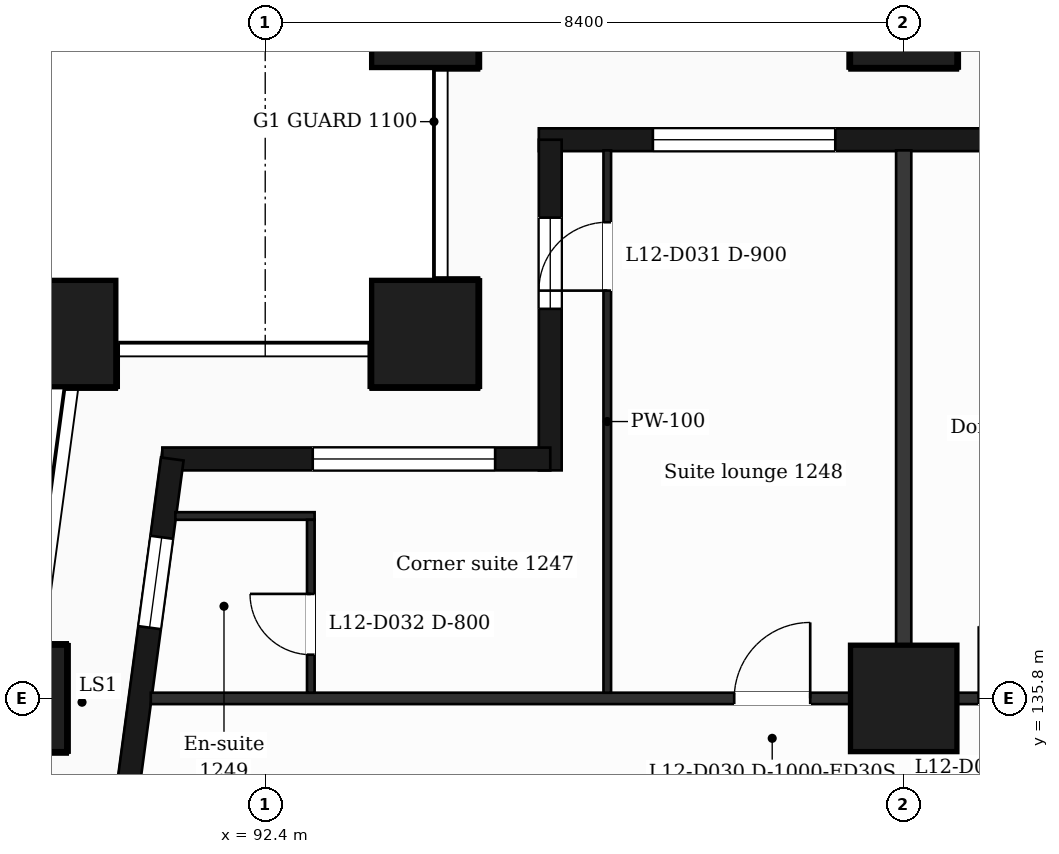
"""IFC4 building model, lengths in metres.
Left out: names, types, materials, properties, quantities, classifications, styles, units other than length and angle.
Written with IfcOpenShell. Run it as: python <this file> out.ifc"""

import sys

from ifc_helpers import new_model, si_unit, direction, frame, frame_2d, origin, origin_2d, place, context, subcontext, project, spatial, rectangle, extrude, element, fill, save


model = new_model("IFC4")
c1 = context("Model", 3, precision=1e-05, world=origin(), true_north=direction((0.0, 1.0)))
c2 = subcontext(c1, "Body", "Model", "MODEL_VIEW")
j1 = project(units=[si_unit("LENGTHUNIT", "METRE"), si_unit("PLANEANGLEUNIT", "RADIAN")], contexts=[c1])
p1 = place(None, origin())
s1 = spatial("IfcSite", under=j1, at=p1, CompositionType="ELEMENT")
p2 = place(p1, origin())
s2 = spatial("IfcBuilding", under=s1, at=p2, CompositionType="ELEMENT")
p3 = place(p2, frame((0.0, 0.0, 60.0)))
s3 = spatial("IfcBuildingStorey", under=s2, at=p3, CompositionType="ELEMENT", Elevation=60.0)
for number, where, z_axis, x_axis in (
    (1, (94.5, 140.6, 0.0), (0.0, 0.0, 1.0), (1.0, 0.0, 0.0)),
    (2, (89.735, 140.6, 0.0), (0.0, 0.0, 1.0), (1.0, 0.0, 0.0)),
    (3, (100.8, 135.8, 0.0), (0.0, 0.0, 1.0), (1.0, 0.0, 0.0)),
    (4, (89.088, 135.8, 0.0), (0.0, 0.0, 1.0), (1.0, 0.0, 0.0)),
    (5, (100.8, 144.8, 0.0), (0.0, 0.0, 1.0), (1.0, 0.0, 0.0)),
    (6, (94.5, 144.8, 0.0), (0.0, 0.0, 1.0), (1.0, 0.0, 0.0)),
):
    element("IfcColumn", number, at=place(p3, frame(where, z_axis=z_axis, x_axis=x_axis)), inside=s3, PredefinedType="COLUMN", context=c2, shape_type="SweptSolid", body=[
        extrude(rectangle(XDim=1.4, YDim=1.4, at=origin_2d()), origin(), (0.0, 0.0, 1.0), 3.5),
    ])
p4 = place(p3, frame((110.4, 143.15, 0.0), z_axis=(0.0, 0.0, 1.0), x_axis=(-1.0, 0.0, 0.0)))
e7 = element("IfcWall", 7, at=p4, inside=s3, PredefinedType="SOLIDWALL", context=c2, shape_type="SweptSolid", body=[
    extrude(rectangle(XDim=14.4, YDim=0.3, at=frame_2d((7.2, 0.0))), origin(), (0.0, 0.0, 1.0), 3.18),
])
p5 = place(p4, frame((2.7, 0.0, 0.9)))
e8 = element("IfcOpeningElement", 8, at=p5, cuts=e7, PredefinedType="OPENING", context=c2, shape_type="SweptSolid", body=[
    extrude(rectangle(XDim=1.2, YDim=2.1, at=frame_2d((0.6, 1.05))), frame((0.0, 0.16, 0.0), z_axis=(0.0, -1.0, 0.0), x_axis=(1.0, 0.0, 0.0)), (0.0, 0.0, 1.0), 0.32),
])
p6 = place(p4, frame((6.9, 0.0, 0.0)))
e9 = element("IfcOpeningElement", 9, at=p6, cuts=e7, PredefinedType="OPENING", context=c2, shape_type="SweptSolid", body=[
    extrude(rectangle(XDim=1.2, YDim=2.4, at=frame_2d((0.6, 1.2))), frame((0.0, 0.16, 0.0), z_axis=(0.0, -1.0, 0.0), x_axis=(1.0, 0.0, 0.0)), (0.0, 0.0, 1.0), 0.32),
])
p7 = place(p4, frame((10.5, 0.0, 0.9)))
e10 = element("IfcOpeningElement", 10, at=p7, cuts=e7, PredefinedType="OPENING", context=c2, shape_type="SweptSolid", body=[
    extrude(rectangle(XDim=2.4, YDim=2.1, at=frame_2d((1.2, 1.05))), frame((0.0, 0.16, 0.0), z_axis=(0.0, -1.0, 0.0), x_axis=(1.0, 0.0, 0.0)), (0.0, 0.0, 1.0), 0.32),
])
p8 = place(p3, frame((96.15, 143.15, 0.0), z_axis=(0.0, 0.0, 1.0), x_axis=(0.0, -1.0, 0.0)))
e11 = element("IfcWall", 11, at=p8, inside=s3, PredefinedType="SOLIDWALL", context=c2, shape_type="SweptSolid", body=[
    extrude(rectangle(XDim=4.35, YDim=0.3, at=frame_2d((2.175, 0.0))), origin(), (0.0, 0.0, 1.0), 3.18),
])
p9 = place(p8, frame((1.025, 0.0, 0.9)))
e12 = element("IfcOpeningElement", 12, at=p9, cuts=e11, PredefinedType="OPENING", context=c2, shape_type="SweptSolid", body=[
    extrude(rectangle(XDim=1.2, YDim=2.1, at=frame_2d((0.6, 1.05))), frame((0.0, 0.16, 0.0), z_axis=(0.0, -1.0, 0.0), x_axis=(1.0, 0.0, 0.0)), (0.0, 0.0, 1.0), 0.32),
])
p10 = place(p3, frame((96.15, 138.95, 0.0), z_axis=(0.0, 0.0, 1.0), x_axis=(-1.0, 0.0, 0.0)))
e13 = element("IfcWall", 13, at=p10, inside=s3, PredefinedType="SOLIDWALL", context=c2, shape_type="SweptSolid", body=[
    extrude(rectangle(XDim=5.104, YDim=0.3, at=frame_2d((2.552, 0.0))), origin(), (0.0, 0.0, 1.0), 3.18),
])
p11 = place(p10, frame((0.725, 0.0, 0.9)))
e14 = element("IfcOpeningElement", 14, at=p11, cuts=e13, PredefinedType="OPENING", context=c2, shape_type="SweptSolid", body=[
    extrude(rectangle(XDim=2.4, YDim=2.1, at=frame_2d((1.2, 1.05))), frame((0.0, 0.16, 0.0), z_axis=(0.0, -1.0, 0.0), x_axis=(1.0, 0.0, 0.0)), (0.0, 0.0, 1.0), 0.32),
])
p12 = place(p3, frame((91.177, 138.95, 0.0), z_axis=(0.0, 0.0, 1.0), x_axis=(-0.133426664613, -0.991058689065, 0.0)))
e15 = element("IfcWall", 15, at=p12, inside=s3, PredefinedType="SOLIDWALL", context=c2, shape_type="SweptSolid", body=[
    extrude(rectangle(XDim=6.609, YDim=0.3, at=frame_2d((3.305, 0.0))), origin(), (0.0, 0.0, 1.0), 3.18),
])
p13 = place(p12, frame((1.039, 0.0, 0.9)))
e16 = element("IfcOpeningElement", 16, at=p13, cuts=e15, PredefinedType="OPENING", context=c2, shape_type="SweptSolid", body=[
    extrude(rectangle(XDim=1.2, YDim=2.1, at=frame_2d((0.6, 1.05))), frame((0.0, 0.16, 0.0), z_axis=(0.0, -1.0, 0.0), x_axis=(1.0, 0.0, 0.0)), (0.0, 0.0, 1.0), 0.32),
])
p14 = place(p12, frame((4.294, 0.0, 0.0)))
e17 = element("IfcOpeningElement", 17, at=p14, cuts=e15, PredefinedType="OPENING", context=c2, shape_type="SweptSolid", body=[
    extrude(rectangle(XDim=1.2, YDim=2.4, at=frame_2d((0.6, 1.2))), frame((0.0, 0.16, 0.0), z_axis=(0.0, -1.0, 0.0), x_axis=(1.0, 0.0, 0.0)), (0.0, 0.0, 1.0), 0.32),
])
p15 = place(p3, frame((90.895, 135.8, 0.0), z_axis=(0.0, 0.0, 1.0), x_axis=(1.0, 0.0, 0.0)))
e18 = element("IfcWall", 18, at=p15, inside=s3, PredefinedType="PARTITIONING", context=c2, shape_type="SweptSolid", body=[
    extrude(rectangle(XDim=45.011, YDim=0.15, at=frame_2d((22.505, 0.0))), origin(), (0.0, 0.0, 1.0), 3.18),
])
p16 = place(p15, frame((7.675, 0.0, 0.0)))
e19 = element("IfcOpeningElement", 19, at=p16, cuts=e18, PredefinedType="OPENING", context=c2, shape_type="SweptSolid", body=[
    extrude(rectangle(XDim=1.0, YDim=2.1, at=frame_2d((0.5, 1.05))), frame((0.0, 0.085, 0.0), z_axis=(0.0, -1.0, 0.0), x_axis=(1.0, 0.0, 0.0)), (0.0, 0.0, 1.0), 0.17),
])
p17 = place(p15, frame((10.892, 0.0, 0.0)))
e20 = element("IfcOpeningElement", 20, at=p17, cuts=e18, PredefinedType="OPENING", context=c2, shape_type="SweptSolid", body=[
    extrude(rectangle(XDim=0.95, YDim=2.1, at=frame_2d((0.475, 1.05))), frame((0.0, 0.085, 0.0), z_axis=(0.0, -1.0, 0.0), x_axis=(1.0, 0.0, 0.0)), (0.0, 0.0, 1.0), 0.17),
])
p18 = place(p15, frame((16.442, 0.0, 0.0)))
e21 = element("IfcOpeningElement", 21, at=p18, cuts=e18, PredefinedType="OPENING", context=c2, shape_type="SweptSolid", body=[
    extrude(rectangle(XDim=0.95, YDim=2.1, at=frame_2d((0.475, 1.05))), frame((0.0, 0.085, 0.0), z_axis=(0.0, -1.0, 0.0), x_axis=(1.0, 0.0, 0.0)), (0.0, 0.0, 1.0), 0.17),
])
p19 = place(p15, frame((22.368, 0.0, 0.0)))
e22 = element("IfcOpeningElement", 22, at=p19, cuts=e18, PredefinedType="OPENING", context=c2, shape_type="SweptSolid", body=[
    extrude(rectangle(XDim=0.95, YDim=2.1, at=frame_2d((0.475, 1.05))), frame((0.0, 0.085, 0.0), z_axis=(0.0, -1.0, 0.0), x_axis=(1.0, 0.0, 0.0)), (0.0, 0.0, 1.0), 0.17),
])
p20 = place(p15, frame((31.825, 0.0, 0.0)))
e23 = element("IfcOpeningElement", 23, at=p20, cuts=e18, PredefinedType="OPENING", context=c2, shape_type="SweptSolid", body=[
    extrude(rectangle(XDim=0.95, YDim=2.1, at=frame_2d((0.475, 1.05))), frame((0.0, 0.085, 0.0), z_axis=(0.0, -1.0, 0.0), x_axis=(1.0, 0.0, 0.0)), (0.0, 0.0, 1.0), 0.17),
])
p21 = place(p15, frame((39.814, 0.0, 0.0)))
e24 = element("IfcOpeningElement", 24, at=p21, cuts=e18, PredefinedType="OPENING", context=c2, shape_type="SweptSolid", body=[
    extrude(rectangle(XDim=0.95, YDim=2.1, at=frame_2d((0.475, 1.05))), frame((0.0, 0.085, 0.0), z_axis=(0.0, -1.0, 0.0), x_axis=(1.0, 0.0, 0.0)), (0.0, 0.0, 1.0), 0.17),
])
p22 = place(p3, frame((91.218, 138.2, 0.0), z_axis=(0.0, 0.0, 1.0), x_axis=(1.0, 0.0, 0.0)))
e25 = element("IfcWall", 25, at=p22, inside=s3, PredefinedType="PARTITIONING", context=c2, shape_type="SweptSolid", body=[
    extrude(rectangle(XDim=1.832, YDim=0.1, at=frame_2d((0.916, 0.0))), origin(), (0.0, 0.0, 1.0), 3.18),
])
p23 = place(p3, frame((93.0, 135.875, 0.0), z_axis=(0.0, 0.0, 1.0), x_axis=(0.0, 1.0, 0.0)))
e26 = element("IfcWall", 26, at=p23, inside=s3, PredefinedType="PARTITIONING", context=c2, shape_type="SweptSolid", body=[
    extrude(rectangle(XDim=2.275, YDim=0.1, at=frame_2d((1.137, 0.0))), origin(), (0.0, 0.0, 1.0), 3.18),
])
p24 = place(p23, frame((0.5, 0.0, 0.0)))
e27 = element("IfcOpeningElement", 27, at=p24, cuts=e26, PredefinedType="OPENING", context=c2, shape_type="SweptSolid", body=[
    extrude(rectangle(XDim=0.8, YDim=2.1, at=frame_2d((0.4, 1.05))), frame((0.0, 0.06, 0.0), z_axis=(0.0, -1.0, 0.0), x_axis=(1.0, 0.0, 0.0)), (0.0, 0.0, 1.0), 0.12),
])
p25 = place(p3, frame((96.9, 135.875, 0.0), z_axis=(0.0, 0.0, 1.0), x_axis=(0.0, 1.0, 0.0)))
e28 = element("IfcWall", 28, at=p25, inside=s3, PredefinedType="PARTITIONING", context=c2, shape_type="SweptSolid", body=[
    extrude(rectangle(XDim=7.135, YDim=0.1, at=frame_2d((3.567, 0.0))), origin(), (0.0, 0.0, 1.0), 3.18),
])
p26 = place(p25, frame((5.29, 0.0, 0.0)))
e29 = element("IfcOpeningElement", 29, at=p26, cuts=e28, PredefinedType="OPENING", context=c2, shape_type="SweptSolid", body=[
    extrude(rectangle(XDim=0.9, YDim=2.1, at=frame_2d((0.45, 1.05))), frame((0.0, 0.06, 0.0), z_axis=(0.0, -1.0, 0.0), x_axis=(1.0, 0.0, 0.0)), (0.0, 0.0, 1.0), 0.12),
])
p27 = place(p3, frame((100.8, 135.875, 0.0), z_axis=(0.0, 0.0, 1.0), x_axis=(0.0, 1.0, 0.0)))
e30 = element("IfcWall", 30, at=p27, inside=s3, PredefinedType="PARTITIONING", context=c2, shape_type="SweptSolid", body=[
    extrude(rectangle(XDim=7.135, YDim=0.2, at=frame_2d((3.567, 0.0))), origin(), (0.0, 0.0, 1.0), 3.18),
])
p28 = place(p7, origin())
e31 = element("IfcWindow", 31, at=p28, inside=s3, PartitioningType="SINGLE_PANEL", PredefinedType="WINDOW", context=c2, shape_type="SweptSolid", body=[
    extrude(rectangle(XDim=2.4, YDim=2.1, at=frame_2d((1.2, 1.05))), frame((0.0, 0.03, 0.0), z_axis=(0.0, -1.0, 0.0), x_axis=(1.0, 0.0, 0.0)), (0.0, 0.0, 1.0), 0.06),
])
fill(e10, e31)
p29 = place(p9, origin())
e32 = element("IfcWindow", 32, at=p29, inside=s3, PartitioningType="SINGLE_PANEL", PredefinedType="WINDOW", context=c2, shape_type="SweptSolid", body=[
    extrude(rectangle(XDim=1.2, YDim=2.1, at=frame_2d((0.6, 1.05))), frame((0.0, 0.03, 0.0), z_axis=(0.0, -1.0, 0.0), x_axis=(1.0, 0.0, 0.0)), (0.0, 0.0, 1.0), 0.06),
])
fill(e12, e32)
p30 = place(p11, origin())
e33 = element("IfcWindow", 33, at=p30, inside=s3, PartitioningType="SINGLE_PANEL", PredefinedType="WINDOW", context=c2, shape_type="SweptSolid", body=[
    extrude(rectangle(XDim=2.4, YDim=2.1, at=frame_2d((1.2, 1.05))), frame((0.0, 0.03, 0.0), z_axis=(0.0, -1.0, 0.0), x_axis=(1.0, 0.0, 0.0)), (0.0, 0.0, 1.0), 0.06),
])
fill(e14, e33)
p31 = place(p13, origin())
e34 = element("IfcWindow", 34, at=p31, inside=s3, PartitioningType="SINGLE_PANEL", PredefinedType="WINDOW", context=c2, shape_type="SweptSolid", body=[
    extrude(rectangle(XDim=1.2, YDim=2.1, at=frame_2d((0.6, 1.05))), frame((0.0, 0.03, 0.0), z_axis=(0.0, -1.0, 0.0), x_axis=(1.0, 0.0, 0.0)), (0.0, 0.0, 1.0), 0.06),
])
fill(e16, e34)
p32 = place(p16, origin())
e35 = element("IfcDoor", 35, at=p32, inside=s3, OperationType="SINGLE_SWING_RIGHT", PredefinedType="DOOR", context=c2, shape_type="SweptSolid", body=[
    extrude(rectangle(XDim=1.0, YDim=2.1, at=frame_2d((0.5, 1.05))), frame((0.0, 0.025, 0.0), z_axis=(0.0, -1.0, 0.0), x_axis=(1.0, 0.0, 0.0)), (0.0, 0.0, 1.0), 0.05),
])
fill(e19, e35)
p33 = place(p26, origin())
e36 = element("IfcDoor", 36, at=p33, inside=s3, OperationType="SINGLE_SWING_LEFT", PredefinedType="DOOR", context=c2, shape_type="SweptSolid", body=[
    extrude(rectangle(XDim=0.9, YDim=2.1, at=frame_2d((0.45, 1.05))), frame((0.0, 0.025, 0.0), z_axis=(0.0, -1.0, 0.0), x_axis=(1.0, 0.0, 0.0)), (0.0, 0.0, 1.0), 0.05),
])
fill(e29, e36)
p34 = place(p24, origin())
e37 = element("IfcDoor", 37, at=p34, inside=s3, OperationType="SINGLE_SWING_RIGHT", PredefinedType="DOOR", context=c2, shape_type="SweptSolid", body=[
    extrude(rectangle(XDim=0.8, YDim=2.1, at=frame_2d((0.4, 1.05))), frame((0.0, 0.025, 0.0), z_axis=(0.0, -1.0, 0.0), x_axis=(1.0, 0.0, 0.0)), (0.0, 0.0, 1.0), 0.05),
])
fill(e27, e37)
p35 = place(p17, origin())
e38 = element("IfcDoor", 38, at=p35, inside=s3, OperationType="SINGLE_SWING_LEFT", PredefinedType="DOOR", context=c2, shape_type="SweptSolid", body=[
    extrude(rectangle(XDim=0.95, YDim=2.1, at=frame_2d((0.475, 1.05))), frame((0.0, 0.025, 0.0), z_axis=(0.0, -1.0, 0.0), x_axis=(1.0, 0.0, 0.0)), (0.0, 0.0, 1.0), 0.05),
])
fill(e20, e38)
save(model, sys.argv[1])
